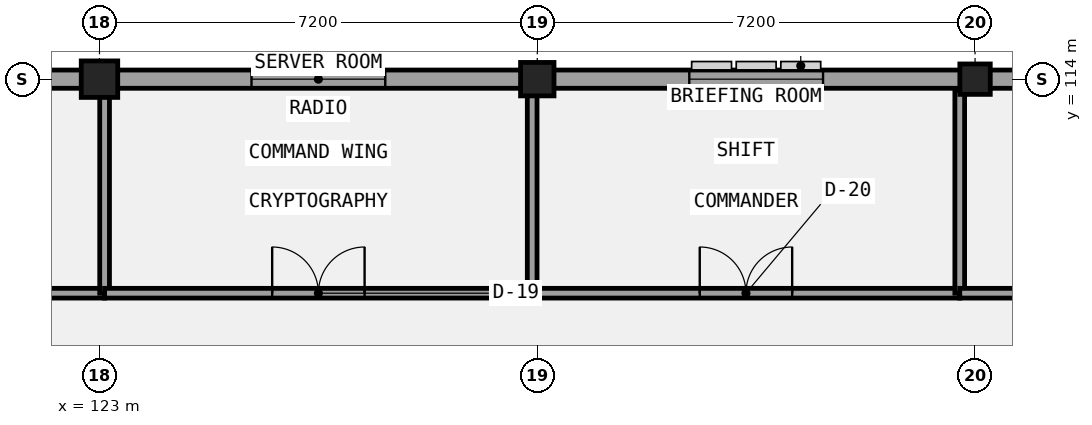
"""IFC4 building model, lengths in metres.
Left out: names, types, materials, properties, quantities, classifications, styles, units other than length and angle.
Written with IfcOpenShell. Run it as: python <this file> out.ifc"""

import sys

from ifc_helpers import new_model, si_unit, direction, frame, frame_2d, origin, origin_2d, place, context, subcontext, project, spatial, rectangle, extrude, element, fill, save


model = new_model("IFC4")
c1 = context("Model", 3, precision=1e-05, world=origin(), true_north=direction((0.0, 1.0)))
c2 = subcontext(c1, "Body", "Model", "MODEL_VIEW")
j1 = project(units=[si_unit("LENGTHUNIT", "METRE"), si_unit("PLANEANGLEUNIT", "RADIAN")], contexts=[c1])
p1 = place(None, origin())
s1 = spatial("IfcSite", under=j1, at=p1, CompositionType="ELEMENT")
p2 = place(p1, origin())
s2 = spatial("IfcBuilding", under=s1, at=p2, CompositionType="ELEMENT")
p3 = place(p2, frame((0.0, 0.0, 26.4)))
s3 = spatial("IfcBuildingStorey", under=s2, at=p3, CompositionType="ELEMENT", Elevation=26.4)
p4 = place(p3, frame((123.0, 114.0, 0.0), z_axis=(0.0, 0.0, 1.0), x_axis=(1.0, 0.0, 0.0)))
e1 = element("IfcColumn", 1, at=p4, inside=s3, PredefinedType="COLUMN", context=c2, shape_type="SweptSolid", body=[
    extrude(rectangle(XDim=0.6, YDim=0.6, at=origin_2d()), origin(), (0.0, 0.0, 1.0), 4.5),
])
p5 = place(p3, frame((130.2, 114.0, 0.0), z_axis=(0.0, 0.0, 1.0), x_axis=(1.0, 0.0, 0.0)))
e2 = element("IfcColumn", 2, at=p5, inside=s3, PredefinedType="COLUMN", context=c2, shape_type="SweptSolid", body=[
    extrude(rectangle(XDim=0.55, YDim=0.55, at=origin_2d()), origin(), (0.0, 0.0, 1.0), 4.5),
])
p6 = place(p3, frame((137.4, 114.0, 0.0), z_axis=(0.0, 0.0, 1.0), x_axis=(1.0, 0.0, 0.0)))
e3 = element("IfcColumn", 3, at=p6, inside=s3, PredefinedType="COLUMN", context=c2, shape_type="SweptSolid", body=[
    extrude(rectangle(XDim=0.5, YDim=0.5, at=origin_2d()), origin(), (0.0, 0.0, 1.0), 4.5),
])
p7 = place(p3, frame((144.75, 114.0, 0.0), z_axis=(0.0, 0.0, 1.0), x_axis=(-1.0, 0.0, 0.0)))
e4 = element("IfcWall", 4, at=p7, inside=s3, PredefinedType="SOLIDWALL", context=c2, shape_type="SweptSolid", body=[
    extrude(rectangle(XDim=36.3, YDim=0.3, at=frame_2d((18.15, 0.0))), origin(), (0.0, 0.0, 1.0), 3.47),
])
p8 = place(p7, frame((31.55, 0.0, 0.95)))
e5 = element("IfcOpeningElement", 5, at=p8, cuts=e4, PredefinedType="OPENING", context=c2, shape_type="SweptSolid", body=[
    extrude(rectangle(XDim=2.0, YDim=1.9, at=frame_2d((1.0, 0.95))), frame((0.0, 0.16, 0.0), z_axis=(0.0, -1.0, 0.0), x_axis=(1.0, 0.0, 0.0)), (0.0, 0.0, 1.0), 0.32),
])
p9 = place(p7, frame((24.35, 0.0, 0.95)))
e6 = element("IfcOpeningElement", 6, at=p9, cuts=e4, PredefinedType="OPENING", context=c2, shape_type="SweptSolid", body=[
    extrude(rectangle(XDim=2.0, YDim=2.15, at=frame_2d((1.0, 1.075))), frame((0.0, 0.16, 0.0), z_axis=(0.0, -1.0, 0.0), x_axis=(1.0, 0.0, 0.0)), (0.0, 0.0, 1.0), 0.32),
])
p10 = place(p7, frame((17.05, 0.0, 0.95)))
e7 = element("IfcOpeningElement", 7, at=p10, cuts=e4, PredefinedType="OPENING", context=c2, shape_type="SweptSolid", body=[
    extrude(rectangle(XDim=2.2, YDim=1.4, at=frame_2d((1.1, 0.7))), frame((0.0, 0.16, 0.0), z_axis=(0.0, -1.0, 0.0), x_axis=(1.0, 0.0, 0.0)), (0.0, 0.0, 1.0), 0.32),
])
p11 = place(p7, frame((9.85, 0.0, 0.95)))
e8 = element("IfcOpeningElement", 8, at=p11, cuts=e4, PredefinedType="OPENING", context=c2, shape_type="SweptSolid", body=[
    extrude(rectangle(XDim=2.2, YDim=1.65, at=frame_2d((1.1, 0.825))), frame((0.0, 0.16, 0.0), z_axis=(0.0, -1.0, 0.0), x_axis=(1.0, 0.0, 0.0)), (0.0, 0.0, 1.0), 0.32),
])
p12 = place(p7, frame((2.65, 0.0, 0.95)))
e9 = element("IfcOpeningElement", 9, at=p12, cuts=e4, PredefinedType="OPENING", context=c2, shape_type="SweptSolid", body=[
    extrude(rectangle(XDim=2.2, YDim=1.9, at=frame_2d((1.1, 0.95))), frame((0.0, 0.16, 0.0), z_axis=(0.0, -1.0, 0.0), x_axis=(1.0, 0.0, 0.0)), (0.0, 0.0, 1.0), 0.32),
])
p13 = place(p3, frame((116.052, 110.48, 0.0), z_axis=(0.0, 0.0, 1.0), x_axis=(1.0, 0.0, 0.0)))
e10 = element("IfcWall", 10, at=p13, inside=s3, PredefinedType="PARTITIONING", context=c2, shape_type="SweptSolid", body=[
    extrude(rectangle(XDim=7.032, YDim=0.16, at=frame_2d((3.516, 0.0))), origin(), (0.0, 0.0, 1.0), 3.67),
])
p14 = place(p13, frame((2.836, 0.0, 0.0)))
e11 = element("IfcOpeningElement", 11, at=p14, cuts=e10, PredefinedType="OPENING", context=c2, shape_type="SweptSolid", body=[
    extrude(rectangle(XDim=1.36, YDim=2.35, at=frame_2d((0.68, 1.175))), frame((0.0, 0.09, 0.0), z_axis=(0.0, -1.0, 0.0), x_axis=(1.0, 0.0, 0.0)), (0.0, 0.0, 1.0), 0.18),
])
p15 = place(p3, frame((123.084, 110.48, 0.0), z_axis=(0.0, 0.0, 1.0), x_axis=(0.0, 1.0, 0.0)))
e12 = element("IfcWall", 12, at=p15, inside=s3, PredefinedType="PARTITIONING", context=c2, shape_type="SweptSolid", body=[
    extrude(rectangle(XDim=3.34, YDim=0.16, at=frame_2d((1.67, 0.0))), origin(), (0.0, 0.0, 1.0), 3.32),
])
p16 = place(p3, frame((123.084, 110.48, 0.0), z_axis=(0.0, 0.0, 1.0), x_axis=(1.0, 0.0, 0.0)))
e13 = element("IfcWall", 13, at=p16, inside=s3, PredefinedType="PARTITIONING", context=c2, shape_type="SweptSolid", body=[
    extrude(rectangle(XDim=7.032, YDim=0.16, at=frame_2d((3.516, 0.0))), origin(), (0.0, 0.0, 1.0), 3.67),
])
p17 = place(p16, frame((2.756, 0.0, 0.0)))
e14 = element("IfcOpeningElement", 14, at=p17, cuts=e13, PredefinedType="OPENING", context=c2, shape_type="SweptSolid", body=[
    extrude(rectangle(XDim=1.52, YDim=2.1, at=frame_2d((0.76, 1.05))), frame((0.0, 0.09, 0.0), z_axis=(0.0, -1.0, 0.0), x_axis=(1.0, 0.0, 0.0)), (0.0, 0.0, 1.0), 0.18),
])
p18 = place(p3, frame((130.116, 110.48, 0.0), z_axis=(0.0, 0.0, 1.0), x_axis=(0.0, 1.0, 0.0)))
e15 = element("IfcWall", 15, at=p18, inside=s3, PredefinedType="PARTITIONING", context=c2, shape_type="SweptSolid", body=[
    extrude(rectangle(XDim=3.34, YDim=0.16, at=frame_2d((1.67, 0.0))), origin(), (0.0, 0.0, 1.0), 3.22),
])
p19 = place(p3, frame((130.116, 110.48, 0.0), z_axis=(0.0, 0.0, 1.0), x_axis=(1.0, 0.0, 0.0)))
e16 = element("IfcWall", 16, at=p19, inside=s3, PredefinedType="PARTITIONING", context=c2, shape_type="SweptSolid", body=[
    extrude(rectangle(XDim=7.032, YDim=0.16, at=frame_2d((3.516, 0.0))), origin(), (0.0, 0.0, 1.0), 3.67),
])
p20 = place(p19, frame((2.756, 0.0, 0.0)))
e17 = element("IfcOpeningElement", 17, at=p20, cuts=e16, PredefinedType="OPENING", context=c2, shape_type="SweptSolid", body=[
    extrude(rectangle(XDim=1.52, YDim=2.22, at=frame_2d((0.76, 1.11))), frame((0.0, 0.09, 0.0), z_axis=(0.0, -1.0, 0.0), x_axis=(1.0, 0.0, 0.0)), (0.0, 0.0, 1.0), 0.18),
])
p21 = place(p3, frame((137.148, 110.48, 0.0), z_axis=(0.0, 0.0, 1.0), x_axis=(0.0, 1.0, 0.0)))
e18 = element("IfcWall", 18, at=p21, inside=s3, PredefinedType="PARTITIONING", context=c2, shape_type="SweptSolid", body=[
    extrude(rectangle(XDim=3.34, YDim=0.16, at=frame_2d((1.67, 0.0))), origin(), (0.0, 0.0, 1.0), 3.67),
])
p22 = place(p3, frame((137.148, 110.48, 0.0), z_axis=(0.0, 0.0, 1.0), x_axis=(1.0, 0.0, 0.0)))
e19 = element("IfcWall", 19, at=p22, inside=s3, PredefinedType="PARTITIONING", context=c2, shape_type="SweptSolid", body=[
    extrude(rectangle(XDim=7.032, YDim=0.16, at=frame_2d((3.516, 0.0))), origin(), (0.0, 0.0, 1.0), 3.67),
])
p23 = place(p22, frame((2.756, 0.0, 0.0)))
e20 = element("IfcOpeningElement", 20, at=p23, cuts=e19, PredefinedType="OPENING", context=c2, shape_type="SweptSolid", body=[
    extrude(rectangle(XDim=1.52, YDim=2.35, at=frame_2d((0.76, 1.175))), frame((0.0, 0.09, 0.0), z_axis=(0.0, -1.0, 0.0), x_axis=(1.0, 0.0, 0.0)), (0.0, 0.0, 1.0), 0.18),
])
p24 = place(p10, origin())
e21 = element("IfcWindow", 21, at=p24, inside=s3, PartitioningType="SINGLE_PANEL", PredefinedType="WINDOW", context=c2, shape_type="SweptSolid", body=[
    extrude(rectangle(XDim=2.2, YDim=1.4, at=frame_2d((1.1, 0.7))), frame((0.0, 0.03, 0.0), z_axis=(0.0, -1.0, 0.0), x_axis=(1.0, 0.0, 0.0)), (0.0, 0.0, 1.0), 0.06),
])
fill(e7, e21)
p25 = place(p11, origin())
e22 = element("IfcWindow", 22, at=p25, inside=s3, PartitioningType="SINGLE_PANEL", PredefinedType="WINDOW", context=c2, shape_type="SweptSolid", body=[
    extrude(rectangle(XDim=2.2, YDim=1.65, at=frame_2d((1.1, 0.825))), frame((0.0, 0.03, 0.0), z_axis=(0.0, -1.0, 0.0), x_axis=(1.0, 0.0, 0.0)), (0.0, 0.0, 1.0), 0.06),
])
fill(e8, e22)
p26 = place(p17, origin())
e23 = element("IfcDoor", 23, at=p26, inside=s3, OperationType="DOUBLE_DOOR_SINGLE_SWING", PredefinedType="DOOR", context=c2, shape_type="SweptSolid", body=[
    extrude(rectangle(XDim=1.52, YDim=2.1, at=frame_2d((0.76, 1.05))), frame((0.0, 0.025, 0.0), z_axis=(0.0, -1.0, 0.0), x_axis=(1.0, 0.0, 0.0)), (0.0, 0.0, 1.0), 0.05),
])
fill(e14, e23)
p27 = place(p20, origin())
e24 = element("IfcDoor", 24, at=p27, inside=s3, OperationType="DOUBLE_DOOR_SINGLE_SWING", PredefinedType="DOOR", context=c2, shape_type="SweptSolid", body=[
    extrude(rectangle(XDim=1.52, YDim=2.22, at=frame_2d((0.76, 1.11))), frame((0.0, 0.025, 0.0), z_axis=(0.0, -1.0, 0.0), x_axis=(1.0, 0.0, 0.0)), (0.0, 0.0, 1.0), 0.05),
])
fill(e17, e24)
save(model, sys.argv[1])
